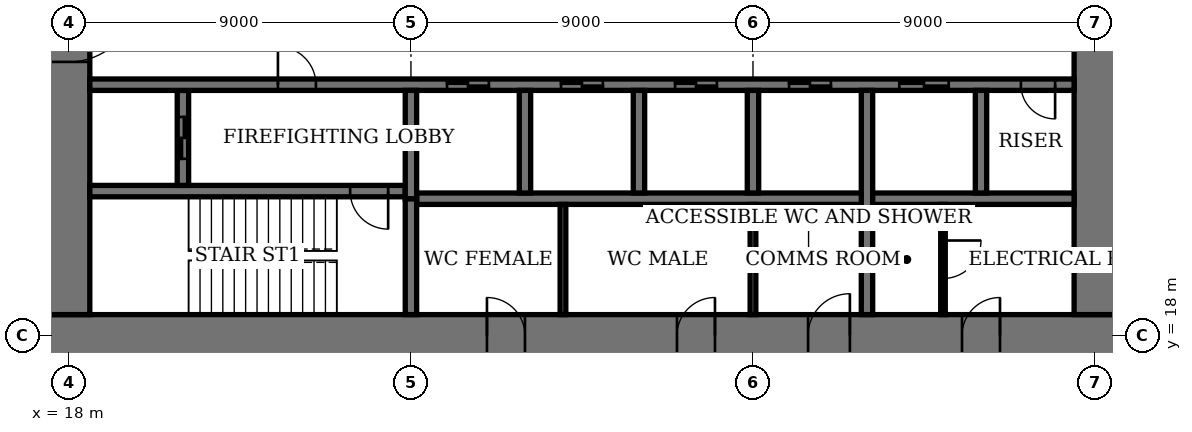
"""IFC4 building model, lengths in metres.
Left out: names, types, materials, properties, quantities, classifications, styles, units other than length and angle.
Written with IfcOpenShell. Run it as: python <this file> out.ifc"""

import sys

from ifc_helpers import new_model, si_unit, direction, frame, frame_2d, origin, place, context, subcontext, project, spatial, rectangle, extrude, element, fill, save


model = new_model("IFC4")
c1 = context("Model", 3, precision=1e-05, world=origin(), true_north=direction((0.0, 1.0)))
c2 = subcontext(c1, "Body", "Model", "MODEL_VIEW")
j1 = project(units=[si_unit("LENGTHUNIT", "METRE"), si_unit("PLANEANGLEUNIT", "RADIAN")], contexts=[c1])
p1 = place(None, origin())
s1 = spatial("IfcSite", under=j1, at=p1, CompositionType="ELEMENT")
p2 = place(p1, origin())
s2 = spatial("IfcBuilding", under=s1, at=p2, CompositionType="ELEMENT")
p3 = place(p2, frame((0.0, 0.0, 71.8)))
s3 = spatial("IfcBuildingStorey", under=s2, at=p3, CompositionType="ELEMENT", Elevation=71.8)
p4 = place(p3, frame((17.45, 18.0, 0.0), z_axis=(0.0, 0.0, 1.0), x_axis=(1.0, 0.0, 0.0)))
e1 = element("IfcWall", 1, at=p4, inside=s3, PredefinedType="SHEAR", context=c2, shape_type="SweptSolid", body=[
    extrude(rectangle(XDim=28.1, YDim=1.1, at=frame_2d((14.05, 0.0))), origin(), (0.0, 0.0, 1.0), 4.0),
])
p5 = place(p4, frame((11.55, 0.0, 0.0)))
e2 = element("IfcOpeningElement", 2, at=p5, cuts=e1, PredefinedType="OPENING", context=c2, shape_type="SweptSolid", body=[
    extrude(rectangle(XDim=1.0, YDim=2.4, at=frame_2d((0.5, 1.2))), frame((0.0, 0.56, 0.0), z_axis=(0.0, -1.0, 0.0), x_axis=(1.0, 0.0, 0.0)), (0.0, 0.0, 1.0), 1.12),
])
p6 = place(p4, frame((16.55, 0.0, 0.0)))
e3 = element("IfcOpeningElement", 3, at=p6, cuts=e1, PredefinedType="OPENING", context=c2, shape_type="SweptSolid", body=[
    extrude(rectangle(XDim=1.0, YDim=2.4, at=frame_2d((0.5, 1.2))), frame((0.0, 0.56, 0.0), z_axis=(0.0, -1.0, 0.0), x_axis=(1.0, 0.0, 0.0)), (0.0, 0.0, 1.0), 1.12),
])
p7 = place(p4, frame((20.0, 0.0, 0.0)))
e4 = element("IfcOpeningElement", 4, at=p7, cuts=e1, PredefinedType="OPENING", context=c2, shape_type="SweptSolid", body=[
    extrude(rectangle(XDim=1.1, YDim=2.4, at=frame_2d((0.55, 1.2))), frame((0.0, 0.56, 0.0), z_axis=(0.0, -1.0, 0.0), x_axis=(1.0, 0.0, 0.0)), (0.0, 0.0, 1.0), 1.12),
])
p8 = place(p4, frame((24.05, 0.0, 0.0)))
e5 = element("IfcOpeningElement", 5, at=p8, cuts=e1, PredefinedType="OPENING", context=c2, shape_type="SweptSolid", body=[
    extrude(rectangle(XDim=1.0, YDim=2.4, at=frame_2d((0.5, 1.2))), frame((0.0, 0.56, 0.0), z_axis=(0.0, -1.0, 0.0), x_axis=(1.0, 0.0, 0.0)), (0.0, 0.0, 1.0), 1.12),
])
p9 = place(p3, frame((18.0, 35.45, 0.0), z_axis=(0.0, 0.0, 1.0), x_axis=(0.0, -1.0, 0.0)))
e6 = element("IfcWall", 6, at=p9, inside=s3, PredefinedType="SHEAR", context=c2, shape_type="SweptSolid", body=[
    extrude(rectangle(XDim=16.9, YDim=1.1, at=frame_2d((8.45, 0.0))), origin(), (0.0, 0.0, 1.0), 4.0),
])
p10 = place(p9, frame((8.45, 0.0, 0.0)))
e7 = element("IfcOpeningElement", 7, at=p10, cuts=e6, PredefinedType="OPENING", context=c2, shape_type="SweptSolid", body=[
    extrude(rectangle(XDim=1.8, YDim=2.4, at=frame_2d((0.9, 1.2))), frame((0.0, 0.56, 0.0), z_axis=(0.0, -1.0, 0.0), x_axis=(1.0, 0.0, 0.0)), (0.0, 0.0, 1.0), 1.12),
])
p11 = place(p3, frame((45.0, 18.55, 0.0), z_axis=(0.0, 0.0, 1.0), x_axis=(0.0, 1.0, 0.0)))
e8 = element("IfcWall", 8, at=p11, inside=s3, PredefinedType="SHEAR", context=c2, shape_type="SweptSolid", body=[
    extrude(rectangle(XDim=16.9, YDim=1.1, at=frame_2d((8.45, 0.0))), origin(), (0.0, 0.0, 1.0), 4.0),
])
p12 = place(p11, frame((8.45, 0.0, 0.0)))
e9 = element("IfcOpeningElement", 9, at=p12, cuts=e8, PredefinedType="OPENING", context=c2, shape_type="SweptSolid", body=[
    extrude(rectangle(XDim=1.8, YDim=2.4, at=frame_2d((0.9, 1.2))), frame((0.0, 0.56, 0.0), z_axis=(0.0, -1.0, 0.0), x_axis=(1.0, 0.0, 0.0)), (0.0, 0.0, 1.0), 1.12),
])
p13 = place(p3, frame((18.55, 21.8, 0.0), z_axis=(0.0, 0.0, 1.0), x_axis=(1.0, 0.0, 0.0)))
e10 = element("IfcWall", 10, at=p13, inside=s3, PredefinedType="SHEAR", context=c2, shape_type="SweptSolid", body=[
    extrude(rectangle(XDim=8.3, YDim=0.3, at=frame_2d((4.15, 0.0))), origin(), (0.0, 0.0, 1.0), 4.0),
])
p14 = place(p13, frame((6.85, 0.0, 0.0)))
e11 = element("IfcOpeningElement", 11, at=p14, cuts=e10, PredefinedType="OPENING", context=c2, shape_type="SweptSolid", body=[
    extrude(rectangle(XDim=1.0, YDim=2.4, at=frame_2d((0.5, 1.2))), frame((0.0, 0.16, 0.0), z_axis=(0.0, -1.0, 0.0), x_axis=(1.0, 0.0, 0.0)), (0.0, 0.0, 1.0), 0.32),
])
p15 = place(p3, frame((27.0, 18.55, 0.0), z_axis=(0.0, 0.0, 1.0), x_axis=(0.0, 1.0, 0.0)))
e12 = element("IfcWall", 12, at=p15, inside=s3, PredefinedType="SHEAR", context=c2, shape_type="SweptSolid", body=[
    extrude(rectangle(XDim=3.05, YDim=0.3, at=frame_2d((1.525, 0.0))), origin(), (0.0, 0.0, 1.0), 4.0),
])
p16 = place(p3, frame((21.0, 21.95, 0.0), z_axis=(0.0, 0.0, 1.0), x_axis=(0.0, 1.0, 0.0)))
e13 = element("IfcWall", 13, at=p16, inside=s3, PredefinedType="SHEAR", context=c2, shape_type="SweptSolid", body=[
    extrude(rectangle(XDim=2.5, YDim=0.3, at=frame_2d((1.25, 0.0))), origin(), (0.0, 0.0, 1.0), 4.0),
])
p17 = place(p16, frame((0.7, 0.0, 0.0)))
e14 = element("IfcOpeningElement", 14, at=p17, cuts=e13, PredefinedType="OPENING", context=c2, shape_type="SweptSolid", body=[
    extrude(rectangle(XDim=1.1, YDim=2.4, at=frame_2d((0.55, 1.2))), frame((0.0, 0.16, 0.0), z_axis=(0.0, -1.0, 0.0), x_axis=(1.0, 0.0, 0.0)), (0.0, 0.0, 1.0), 0.32),
])
p18 = place(p3, frame((18.55, 24.6, 0.0), z_axis=(0.0, 0.0, 1.0), x_axis=(1.0, 0.0, 0.0)))
e15 = element("IfcWall", 15, at=p18, inside=s3, PredefinedType="SHEAR", context=c2, shape_type="SweptSolid", body=[
    extrude(rectangle(XDim=25.9, YDim=0.3, at=frame_2d((12.95, 0.0))), origin(), (0.0, 0.0, 1.0), 4.0),
])
p19 = place(p18, frame((4.95, 0.0, 0.0)))
e16 = element("IfcOpeningElement", 16, at=p19, cuts=e15, PredefinedType="OPENING", context=c2, shape_type="SweptSolid", body=[
    extrude(rectangle(XDim=1.0, YDim=2.4, at=frame_2d((0.5, 1.2))), frame((0.0, 0.16, 0.0), z_axis=(0.0, -1.0, 0.0), x_axis=(1.0, 0.0, 0.0)), (0.0, 0.0, 1.0), 0.32),
])
p20 = place(p18, frame((24.5, 0.0, 0.0)))
e17 = element("IfcOpeningElement", 17, at=p20, cuts=e15, PredefinedType="OPENING", context=c2, shape_type="SweptSolid", body=[
    extrude(rectangle(XDim=0.9, YDim=2.1, at=frame_2d((0.45, 1.05))), frame((0.0, 0.16, 0.0), z_axis=(0.0, -1.0, 0.0), x_axis=(1.0, 0.0, 0.0)), (0.0, 0.0, 1.0), 0.32),
])
p21 = place(p18, frame((9.4, 0.0, 0.0)))
e18 = element("IfcOpeningElement", 18, at=p21, cuts=e15, PredefinedType="OPENING", context=c2, shape_type="SweptSolid", body=[
    extrude(rectangle(XDim=1.1, YDim=2.4, at=frame_2d((0.55, 1.2))), frame((0.0, 0.16, 0.0), z_axis=(0.0, -1.0, 0.0), x_axis=(1.0, 0.0, 0.0)), (0.0, 0.0, 1.0), 0.32),
])
p22 = place(p18, frame((12.4, 0.0, 0.0)))
e19 = element("IfcOpeningElement", 19, at=p22, cuts=e15, PredefinedType="OPENING", context=c2, shape_type="SweptSolid", body=[
    extrude(rectangle(XDim=1.1, YDim=2.4, at=frame_2d((0.55, 1.2))), frame((0.0, 0.16, 0.0), z_axis=(0.0, -1.0, 0.0), x_axis=(1.0, 0.0, 0.0)), (0.0, 0.0, 1.0), 0.32),
])
p23 = place(p18, frame((15.4, 0.0, 0.0)))
e20 = element("IfcOpeningElement", 20, at=p23, cuts=e15, PredefinedType="OPENING", context=c2, shape_type="SweptSolid", body=[
    extrude(rectangle(XDim=1.1, YDim=2.4, at=frame_2d((0.55, 1.2))), frame((0.0, 0.16, 0.0), z_axis=(0.0, -1.0, 0.0), x_axis=(1.0, 0.0, 0.0)), (0.0, 0.0, 1.0), 0.32),
])
p24 = place(p18, frame((18.4, 0.0, 0.0)))
e21 = element("IfcOpeningElement", 21, at=p24, cuts=e15, PredefinedType="OPENING", context=c2, shape_type="SweptSolid", body=[
    extrude(rectangle(XDim=1.1, YDim=2.4, at=frame_2d((0.55, 1.2))), frame((0.0, 0.16, 0.0), z_axis=(0.0, -1.0, 0.0), x_axis=(1.0, 0.0, 0.0)), (0.0, 0.0, 1.0), 0.32),
])
p25 = place(p18, frame((21.3, 0.0, 0.0)))
e22 = element("IfcOpeningElement", 22, at=p25, cuts=e15, PredefinedType="OPENING", context=c2, shape_type="SweptSolid", body=[
    extrude(rectangle(XDim=1.3, YDim=2.4, at=frame_2d((0.65, 1.2))), frame((0.0, 0.16, 0.0), z_axis=(0.0, -1.0, 0.0), x_axis=(1.0, 0.0, 0.0)), (0.0, 0.0, 1.0), 0.32),
])
p26 = place(p3, frame((27.15, 21.6, 0.0), z_axis=(0.0, 0.0, 1.0), x_axis=(1.0, 0.0, 0.0)))
e23 = element("IfcWall", 23, at=p26, inside=s3, PredefinedType="SHEAR", context=c2, shape_type="SweptSolid", body=[
    extrude(rectangle(XDim=17.3, YDim=0.3, at=frame_2d((8.65, 0.0))), origin(), (0.0, 0.0, 1.0), 4.0),
])
for number, where, z_axis, x_axis in (
    (24, (30.0, 21.75, 0.0), (0.0, 0.0, 1.0), (0.0, 1.0, 0.0)),
    (25, (33.0, 21.75, 0.0), (0.0, 0.0, 1.0), (0.0, 1.0, 0.0)),
    (26, (36.0, 21.75, 0.0), (0.0, 0.0, 1.0), (0.0, 1.0, 0.0)),
):
    element("IfcWall", number, at=place(p3, frame(where, z_axis=z_axis, x_axis=x_axis)), inside=s3, PredefinedType="SHEAR", context=c2, shape_type="SweptSolid", body=[
        extrude(rectangle(XDim=2.7, YDim=0.3, at=frame_2d((1.35, 0.0))), origin(), (0.0, 0.0, 1.0), 4.0),
    ])
p27 = place(p3, frame((39.0, 18.55, 0.0), z_axis=(0.0, 0.0, 1.0), x_axis=(0.0, 1.0, 0.0)))
e27 = element("IfcWall", 27, at=p27, inside=s3, PredefinedType="SHEAR", context=c2, shape_type="SweptSolid", body=[
    extrude(rectangle(XDim=5.9, YDim=0.3, at=frame_2d((2.95, 0.0))), origin(), (0.0, 0.0, 1.0), 4.0),
])
p28 = place(p3, frame((42.0, 21.75, 0.0), z_axis=(0.0, 0.0, 1.0), x_axis=(0.0, 1.0, 0.0)))
e28 = element("IfcWall", 28, at=p28, inside=s3, PredefinedType="SHEAR", context=c2, shape_type="SweptSolid", body=[
    extrude(rectangle(XDim=2.7, YDim=0.3, at=frame_2d((1.35, 0.0))), origin(), (0.0, 0.0, 1.0), 4.0),
])
p29 = place(p3, frame((27.0, 21.6, 0.0), z_axis=(0.0, 0.0, 1.0), x_axis=(0.0, 1.0, 0.0)))
e29 = element("IfcWall", 29, at=p29, inside=s3, PredefinedType="SHEAR", context=c2, shape_type="SweptSolid", body=[
    extrude(rectangle(XDim=2.85, YDim=0.3, at=frame_2d((1.425, 0.0))), origin(), (0.0, 0.0, 1.0), 4.0),
])
for number, where, z_axis, x_axis in (
    (30, (31.0, 18.55, 0.0), (0.0, 0.0, 1.0), (0.0, 1.0, 0.0)),
    (31, (36.0, 18.55, 0.0), (0.0, 0.0, 1.0), (0.0, 1.0, 0.0)),
):
    element("IfcWall", number, at=place(p3, frame(where, z_axis=z_axis, x_axis=x_axis)), inside=s3, PredefinedType="PARTITIONING", context=c2, shape_type="SweptSolid", body=[
        extrude(rectangle(XDim=2.9, YDim=0.15, at=frame_2d((1.45, 0.0))), origin(), (0.0, 0.0, 1.0), 3.75),
    ])
p30 = place(p3, frame((41.0, 18.55, 0.0), z_axis=(0.0, 0.0, 1.0), x_axis=(0.0, 1.0, 0.0)))
e32 = element("IfcWall", 32, at=p30, inside=s3, PredefinedType="PARTITIONING", context=c2, shape_type="SweptSolid", body=[
    extrude(rectangle(XDim=2.9, YDim=0.12, at=frame_2d((1.45, 0.0))), origin(), (0.0, 0.0, 1.0), 3.75),
])
p31 = place(p30, frame((0.95, 0.0, 0.0)))
e33 = element("IfcOpeningElement", 33, at=p31, cuts=e32, PredefinedType="OPENING", context=c2, shape_type="SweptSolid", body=[
    extrude(rectangle(XDim=1.0, YDim=2.4, at=frame_2d((0.5, 1.2))), frame((0.0, 0.07, 0.0), z_axis=(0.0, -1.0, 0.0), x_axis=(1.0, 0.0, 0.0)), (0.0, 0.0, 1.0), 0.14),
])
p32 = place(p10, origin())
e34 = element("IfcDoor", 34, at=p32, inside=s3, OperationType="DOUBLE_DOOR_DOUBLE_SWING", PredefinedType="DOOR", context=c2, shape_type="SweptSolid", body=[
    extrude(rectangle(XDim=1.8, YDim=2.4, at=frame_2d((0.9, 1.2))), frame((0.0, 0.03, 0.0), z_axis=(0.0, -1.0, 0.0), x_axis=(1.0, 0.0, 0.0)), (0.0, 0.0, 1.0), 0.06),
    extrude(rectangle(XDim=0.04, YDim=2.4, at=frame_2d((0.02, 1.2))), frame((0.0, 0.55, 0.0), z_axis=(0.0, -1.0, 0.0), x_axis=(1.0, 0.0, 0.0)), (0.0, 0.0, 1.0), 1.1),
    extrude(rectangle(XDim=0.04, YDim=2.4, at=frame_2d((1.78, 1.2))), frame((0.0, 0.55, 0.0), z_axis=(0.0, -1.0, 0.0), x_axis=(1.0, 0.0, 0.0)), (0.0, 0.0, 1.0), 1.1),
    extrude(rectangle(XDim=1.8, YDim=0.04, at=frame_2d((0.9, 2.38))), frame((0.0, 0.55, 0.0), z_axis=(0.0, -1.0, 0.0), x_axis=(1.0, 0.0, 0.0)), (0.0, 0.0, 1.0), 1.1),
])
fill(e7, e34)
p33 = place(p5, origin())
e35 = element("IfcDoor", 35, at=p33, inside=s3, OperationType="SINGLE_SWING_RIGHT", PredefinedType="DOOR", context=c2, shape_type="SweptSolid", body=[
    extrude(rectangle(XDim=1.0, YDim=2.4, at=frame_2d((0.5, 1.2))), frame((0.0, 0.025, 0.0), z_axis=(0.0, -1.0, 0.0), x_axis=(1.0, 0.0, 0.0)), (0.0, 0.0, 1.0), 0.05),
    extrude(rectangle(XDim=0.04, YDim=2.4, at=frame_2d((0.02, 1.2))), frame((0.0, 0.4, 0.0), z_axis=(0.0, -1.0, 0.0), x_axis=(1.0, 0.0, 0.0)), (0.0, 0.0, 1.0), 0.8),
    extrude(rectangle(XDim=0.04, YDim=2.4, at=frame_2d((0.98, 1.2))), frame((0.0, 0.4, 0.0), z_axis=(0.0, -1.0, 0.0), x_axis=(1.0, 0.0, 0.0)), (0.0, 0.0, 1.0), 0.8),
    extrude(rectangle(XDim=1.0, YDim=0.04, at=frame_2d((0.5, 2.38))), frame((0.0, 0.4, 0.0), z_axis=(0.0, -1.0, 0.0), x_axis=(1.0, 0.0, 0.0)), (0.0, 0.0, 1.0), 0.8),
])
fill(e2, e35)
p34 = place(p6, origin())
e36 = element("IfcDoor", 36, at=p34, inside=s3, OperationType="SINGLE_SWING_LEFT", PredefinedType="DOOR", context=c2, shape_type="SweptSolid", body=[
    extrude(rectangle(XDim=1.0, YDim=2.4, at=frame_2d((0.5, 1.2))), frame((0.0, 0.025, 0.0), z_axis=(0.0, -1.0, 0.0), x_axis=(1.0, 0.0, 0.0)), (0.0, 0.0, 1.0), 0.05),
    extrude(rectangle(XDim=0.04, YDim=2.4, at=frame_2d((0.02, 1.2))), frame((0.0, 0.4, 0.0), z_axis=(0.0, -1.0, 0.0), x_axis=(1.0, 0.0, 0.0)), (0.0, 0.0, 1.0), 0.8),
    extrude(rectangle(XDim=0.04, YDim=2.4, at=frame_2d((0.98, 1.2))), frame((0.0, 0.4, 0.0), z_axis=(0.0, -1.0, 0.0), x_axis=(1.0, 0.0, 0.0)), (0.0, 0.0, 1.0), 0.8),
    extrude(rectangle(XDim=1.0, YDim=0.04, at=frame_2d((0.5, 2.38))), frame((0.0, 0.4, 0.0), z_axis=(0.0, -1.0, 0.0), x_axis=(1.0, 0.0, 0.0)), (0.0, 0.0, 1.0), 0.8),
])
fill(e3, e36)
p35 = place(p7, origin())
e37 = element("IfcDoor", 37, at=p35, inside=s3, OperationType="SINGLE_SWING_LEFT", PredefinedType="DOOR", context=c2, shape_type="SweptSolid", body=[
    extrude(rectangle(XDim=1.1, YDim=2.4, at=frame_2d((0.55, 1.2))), frame((0.0, 0.025, 0.0), z_axis=(0.0, -1.0, 0.0), x_axis=(1.0, 0.0, 0.0)), (0.0, 0.0, 1.0), 0.05),
    extrude(rectangle(XDim=0.04, YDim=2.4, at=frame_2d((0.02, 1.2))), frame((0.0, 0.44, 0.0), z_axis=(0.0, -1.0, 0.0), x_axis=(1.0, 0.0, 0.0)), (0.0, 0.0, 1.0), 0.88),
    extrude(rectangle(XDim=0.04, YDim=2.4, at=frame_2d((1.08, 1.2))), frame((0.0, 0.44, 0.0), z_axis=(0.0, -1.0, 0.0), x_axis=(1.0, 0.0, 0.0)), (0.0, 0.0, 1.0), 0.88),
    extrude(rectangle(XDim=1.1, YDim=0.04, at=frame_2d((0.55, 2.38))), frame((0.0, 0.44, 0.0), z_axis=(0.0, -1.0, 0.0), x_axis=(1.0, 0.0, 0.0)), (0.0, 0.0, 1.0), 0.88),
])
fill(e4, e37)
p36 = place(p8, origin())
e38 = element("IfcDoor", 38, at=p36, inside=s3, OperationType="SINGLE_SWING_LEFT", PredefinedType="DOOR", context=c2, shape_type="SweptSolid", body=[
    extrude(rectangle(XDim=1.0, YDim=2.4, at=frame_2d((0.5, 1.2))), frame((0.0, 0.025, 0.0), z_axis=(0.0, -1.0, 0.0), x_axis=(1.0, 0.0, 0.0)), (0.0, 0.0, 1.0), 0.05),
    extrude(rectangle(XDim=0.04, YDim=2.4, at=frame_2d((0.02, 1.2))), frame((0.0, 0.4, 0.0), z_axis=(0.0, -1.0, 0.0), x_axis=(1.0, 0.0, 0.0)), (0.0, 0.0, 1.0), 0.8),
    extrude(rectangle(XDim=0.04, YDim=2.4, at=frame_2d((0.98, 1.2))), frame((0.0, 0.4, 0.0), z_axis=(0.0, -1.0, 0.0), x_axis=(1.0, 0.0, 0.0)), (0.0, 0.0, 1.0), 0.8),
    extrude(rectangle(XDim=1.0, YDim=0.04, at=frame_2d((0.5, 2.38))), frame((0.0, 0.4, 0.0), z_axis=(0.0, -1.0, 0.0), x_axis=(1.0, 0.0, 0.0)), (0.0, 0.0, 1.0), 0.8),
])
fill(e5, e38)
p37 = place(p14, origin())
e39 = element("IfcDoor", 39, at=p37, inside=s3, OperationType="SINGLE_SWING_RIGHT", PredefinedType="DOOR", context=c2, shape_type="SweptSolid", body=[
    extrude(rectangle(XDim=1.0, YDim=2.4, at=frame_2d((0.5, 1.2))), frame((0.0, 0.03, 0.0), z_axis=(0.0, -1.0, 0.0), x_axis=(1.0, 0.0, 0.0)), (0.0, 0.0, 1.0), 0.06),
])
fill(e11, e39)
p38 = place(p19, origin())
e40 = element("IfcDoor", 40, at=p38, inside=s3, OperationType="SINGLE_SWING_RIGHT", PredefinedType="DOOR", context=c2, shape_type="SweptSolid", body=[
    extrude(rectangle(XDim=1.0, YDim=2.4, at=frame_2d((0.5, 1.2))), frame((0.0, 0.03, 0.0), z_axis=(0.0, -1.0, 0.0), x_axis=(1.0, 0.0, 0.0)), (0.0, 0.0, 1.0), 0.06),
])
fill(e16, e40)
p39 = place(p20, origin())
e41 = element("IfcDoor", 41, at=p39, inside=s3, OperationType="SINGLE_SWING_RIGHT", PredefinedType="DOOR", context=c2, shape_type="SweptSolid", body=[
    extrude(rectangle(XDim=0.9, YDim=2.1, at=frame_2d((0.45, 1.05))), frame((0.0, 0.03, 0.0), z_axis=(0.0, -1.0, 0.0), x_axis=(1.0, 0.0, 0.0)), (0.0, 0.0, 1.0), 0.06),
])
fill(e17, e41)
p40 = place(p31, origin())
e42 = element("IfcDoor", 42, at=p40, inside=s3, OperationType="SINGLE_SWING_RIGHT", PredefinedType="DOOR", context=c2, shape_type="SweptSolid", body=[
    extrude(rectangle(XDim=1.0, YDim=2.4, at=frame_2d((0.5, 1.2))), frame((0.0, 0.03, 0.0), z_axis=(0.0, -1.0, 0.0), x_axis=(1.0, 0.0, 0.0)), (0.0, 0.0, 1.0), 0.06),
])
fill(e33, e42)
p41 = place(p21, origin())
e43 = element("IfcDoor", 43, at=p41, inside=s3, OperationType="DOUBLE_DOOR_SLIDING", PredefinedType="DOOR", context=c2, shape_type="SweptSolid", body=[
    extrude(rectangle(XDim=1.1, YDim=2.4, at=frame_2d((0.55, 1.2))), frame((0.0, 0.02, 0.0), z_axis=(0.0, -1.0, 0.0), x_axis=(1.0, 0.0, 0.0)), (0.0, 0.0, 1.0), 0.04),
])
fill(e18, e43)
p42 = place(p22, origin())
e44 = element("IfcDoor", 44, at=p42, inside=s3, OperationType="DOUBLE_DOOR_SLIDING", PredefinedType="DOOR", context=c2, shape_type="SweptSolid", body=[
    extrude(rectangle(XDim=1.1, YDim=2.4, at=frame_2d((0.55, 1.2))), frame((0.0, 0.02, 0.0), z_axis=(0.0, -1.0, 0.0), x_axis=(1.0, 0.0, 0.0)), (0.0, 0.0, 1.0), 0.04),
])
fill(e19, e44)
p43 = place(p23, origin())
e45 = element("IfcDoor", 45, at=p43, inside=s3, OperationType="DOUBLE_DOOR_SLIDING", PredefinedType="DOOR", context=c2, shape_type="SweptSolid", body=[
    extrude(rectangle(XDim=1.1, YDim=2.4, at=frame_2d((0.55, 1.2))), frame((0.0, 0.02, 0.0), z_axis=(0.0, -1.0, 0.0), x_axis=(1.0, 0.0, 0.0)), (0.0, 0.0, 1.0), 0.04),
])
fill(e20, e45)
p44 = place(p24, origin())
e46 = element("IfcDoor", 46, at=p44, inside=s3, OperationType="DOUBLE_DOOR_SLIDING", PredefinedType="DOOR", context=c2, shape_type="SweptSolid", body=[
    extrude(rectangle(XDim=1.1, YDim=2.4, at=frame_2d((0.55, 1.2))), frame((0.0, 0.02, 0.0), z_axis=(0.0, -1.0, 0.0), x_axis=(1.0, 0.0, 0.0)), (0.0, 0.0, 1.0), 0.04),
])
fill(e21, e46)
p45 = place(p25, origin())
e47 = element("IfcDoor", 47, at=p45, inside=s3, OperationType="DOUBLE_DOOR_SLIDING", PredefinedType="DOOR", context=c2, shape_type="SweptSolid", body=[
    extrude(rectangle(XDim=1.3, YDim=2.4, at=frame_2d((0.65, 1.2))), frame((0.0, 0.02, 0.0), z_axis=(0.0, -1.0, 0.0), x_axis=(1.0, 0.0, 0.0)), (0.0, 0.0, 1.0), 0.04),
])
fill(e22, e47)
p46 = place(p17, origin())
e48 = element("IfcDoor", 48, at=p46, inside=s3, OperationType="DOUBLE_DOOR_SLIDING", PredefinedType="DOOR", context=c2, shape_type="SweptSolid", body=[
    extrude(rectangle(XDim=1.1, YDim=2.4, at=frame_2d((0.55, 1.2))), frame((0.0, 0.03, 0.0), z_axis=(0.0, -1.0, 0.0), x_axis=(1.0, 0.0, 0.0)), (0.0, 0.0, 1.0), 0.06),
])
fill(e14, e48)
save(model, sys.argv[1])
